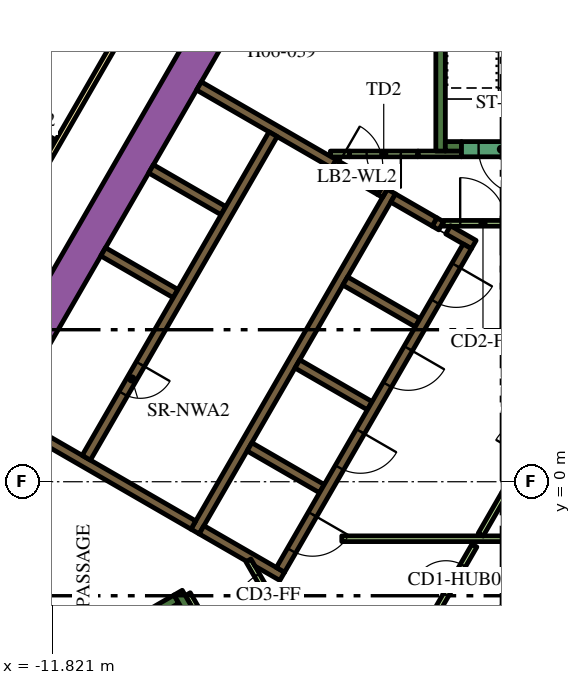
"""IFC4 building model, lengths in metres.
Left out: names, types, materials, properties, quantities, classifications, styles, units other than length and angle.
Written with IfcOpenShell. Run it as: python <this file> out.ifc"""

import sys

from ifc_helpers import new_model, si_unit, direction, frame, frame_2d, origin, place, context, subcontext, project, spatial, polyline, rectangle, outline, extrude, element, fill, save


model = new_model("IFC4")
c1 = context("Model", 3, precision=1e-05, world=origin(), true_north=direction((0.0, 1.0)))
c2 = subcontext(c1, "Body", "Model", "MODEL_VIEW")
j1 = project(units=[si_unit("LENGTHUNIT", "METRE"), si_unit("PLANEANGLEUNIT", "RADIAN")], contexts=[c1])
p1 = place(None, origin())
s1 = spatial("IfcSite", under=j1, at=p1, CompositionType="ELEMENT")
p2 = place(p1, origin())
s2 = spatial("IfcBuilding", under=s1, at=p2, CompositionType="ELEMENT")
p3 = place(p2, frame((0.0, 0.0, 91.5)))
s3 = spatial("IfcBuildingStorey", under=s2, at=p3, CompositionType="ELEMENT", Elevation=91.5)
p4 = place(p3, frame((-15.36, -1.503, 0.0), z_axis=(0.0, 0.0, 1.0), x_axis=(0.50000389221, 0.866023156604, 0.0)))
e1 = element("IfcWall", 1, at=p4, inside=s3, PredefinedType="SOLIDWALL", context=c2, shape_type="SweptSolid", body=[
    extrude(rectangle(XDim=21.0, YDim=0.9, at=frame_2d((10.5, 0.0))), origin(), (0.0, 0.0, 1.0), 3.9),
])
p5 = place(p3, frame((-1.6, 8.7, 0.0), z_axis=(0.0, 0.0, 1.0), x_axis=(0.0, 1.0, 0.0)))
e2 = element("IfcWall", 2, at=p5, inside=s3, PredefinedType="SOLIDWALL", context=c2, shape_type="SweptSolid", body=[
    extrude(rectangle(XDim=7.05, YDim=0.25, at=frame_2d((3.525, 0.0))), origin(), (0.0, 0.0, 1.0), 3.9),
])
p6 = place(p3, frame((-1.475, 8.825, 0.0), z_axis=(0.0, 0.0, 1.0), x_axis=(1.0, 0.0, 0.0)))
e3 = element("IfcWall", 3, at=p6, inside=s3, PredefinedType="SOLIDWALL", context=c2, shape_type="SweptSolid", body=[
    extrude(rectangle(XDim=0.425, YDim=0.25, at=frame_2d((0.212, 0.0))), origin(), (0.0, 0.0, 1.0), 3.9),
])
p7 = place(p3, frame((-14.44, -6.49, 0.0), z_axis=(0.0, 0.0, 1.0), x_axis=(0.866022966069, 0.500004222222, 0.0)))
e4 = element("IfcWall", 4, at=p7, inside=s3, PredefinedType="SOLIDWALL", context=c2, shape_type="SweptSolid", body=[
    extrude(rectangle(XDim=6.8, YDim=0.25, at=frame_2d((3.4, 0.0))), origin(), (0.0, 0.0, 1.0), 3.9),
])
p8 = place(p3, frame((-8.168, -3.503, 0.0), z_axis=(0.0, 0.0, 1.0), x_axis=(-0.499952099219, 0.866053057547, 0.0)))
e5 = element("IfcWall", 5, at=p8, inside=s3, PredefinedType="SOLIDWALL", context=c2, shape_type="SweptSolid", body=[
    extrude(rectangle(XDim=0.675, YDim=0.25, at=frame_2d((0.337, 0.0))), origin(), (0.0, 0.0, 1.0), 3.9),
])
p9 = place(p3, frame((-8.06, -1.311, 0.0), z_axis=(0.0, 0.0, 1.0), x_axis=(0.50000273126, 0.866023826885, 0.0)))
e6 = element("IfcWall", 6, at=p9, inside=s3, PredefinedType="SOLIDWALL", context=c2, shape_type="SweptSolid", body=[
    extrude(rectangle(XDim=10.33, YDim=0.25, at=frame_2d((5.165, 0.0))), origin(), (0.0, 0.0, 1.0), 3.9),
])
p10 = place(p3, frame((-1.758, 6.835, 0.0), z_axis=(0.0, 0.0, 1.0), x_axis=(0.865982457891, -0.500074377092, 0.0)))
e7 = element("IfcWall", 7, at=p10, inside=s3, PredefinedType="SOLIDWALL", context=c2, shape_type="SweptSolid", body=[
    extrude(rectangle(XDim=0.2, YDim=0.25, at=frame_2d((0.1, 0.0))), origin(), (0.0, 0.0, 1.0), 3.9),
])
p11 = place(p3, frame((-1.76, 6.836, 0.0), z_axis=(0.0, 0.0, 1.0), x_axis=(-0.865952863304, 0.500125622755, 0.0)))
e8 = element("IfcWall", 8, at=p11, inside=s3, PredefinedType="SOLIDWALL", context=c2, shape_type="SweptSolid", body=[
    extrude(rectangle(XDim=1.258, YDim=0.25, at=frame_2d((0.629, 0.0))), origin(), (0.0, 0.0, 1.0), 3.9),
])
p12 = place(p3, frame((-0.728, 6.24, 0.0), z_axis=(0.0, 0.0, 1.0), x_axis=(-0.865955664968, 0.500120771724, 0.0)))
e9 = element("IfcWall", 9, at=p12, inside=s3, PredefinedType="SOLIDWALL", context=c2, shape_type="SweptSolid", body=[
    extrude(rectangle(XDim=0.778, YDim=0.25, at=frame_2d((0.389, 0.0))), origin(), (0.0, 0.0, 1.0), 3.9),
])
for number, where, z_axis, x_axis in (
    (10, (-2.204, 4.182, 0.0), (0.0, 0.0, 1.0), (-0.866, 0.5, 0.0)),
    (11, (-5.369, 3.1, 0.0), (0.0, 0.0, 1.0), (0.866, -0.5, 0.0)),
    (12, (-4.724, -0.182, 0.0), (0.0, 0.0, 1.0), (-0.866, 0.5, 0.0)),
):
    element("IfcWall", number, at=place(p3, frame(where, z_axis=z_axis, x_axis=x_axis)), inside=s3, PredefinedType="SOLIDWALL", context=c2, shape_type="SweptSolid", body=[
        extrude(rectangle(XDim=2.2, YDim=0.25, at=frame_2d((1.1, 0.0))), origin(), (0.0, 0.0, 1.0), 3.9),
    ])
p13 = place(p3, origin())
e13 = element("IfcWall", 13, at=p13, inside=s3, PredefinedType="SOLIDWALL", context=c2, shape_type="SweptSolid", body=[
    extrude(outline(polyline([(-5.922, -2.257), (-5.922, -2.257), (-5.705, -2.382), (-5.83, -2.598), (-6.483, -2.221), (-6.591, -2.033), (-6.591, -2.033), (-6.7, -2.096), (-7.952, -1.373), (-7.827, -1.156), (-5.922, -2.257)])), origin(), (0.0, 0.0, 1.0), 3.9),
])
p14 = place(p3, frame((-8.106, -1.14, 0.0), z_axis=(0.0, 0.0, 1.0), x_axis=(-0.866000643155, 0.500042884217, 0.0)))
e14 = element("IfcWall", 14, at=p14, inside=s3, PredefinedType="SOLIDWALL", context=c2, shape_type="SweptSolid", body=[
    extrude(rectangle(XDim=5.65, YDim=0.25, at=frame_2d((2.825, 0.0))), origin(), (0.0, 0.0, 1.0), 3.9),
])
e15 = element("IfcWall", 15, at=p13, inside=s3, PredefinedType="SOLIDWALL", context=c2, shape_type="SweptSolid", body=[
    extrude(outline(polyline([(-3.128, 7.481), (-3.259, 7.557), (-3.134, 7.773), (-3.003, 7.698), (-3.128, 7.481)])), origin(), (0.0, 0.0, 1.0), 3.9),
])
for number, where, z_axis, x_axis in (
    (16, (-8.574, 4.95, 0.0), (0.0, 0.0, 1.0), (-0.866, 0.5, 0.0)),
    (17, (-7.314, 7.132, 0.0), (0.0, 0.0, 1.0), (-0.866, 0.5, 0.0)),
):
    element("IfcWall", number, at=place(p3, frame(where, z_axis=z_axis, x_axis=x_axis)), inside=s3, PredefinedType="SOLIDWALL", context=c2, shape_type="SweptSolid", body=[
        extrude(rectangle(XDim=2.2, YDim=0.25, at=frame_2d((1.1, 0.0))), origin(), (0.0, 0.0, 1.0), 3.9),
    ])
p15 = place(p3, frame((-7.959, 10.415, 0.0), z_axis=(0.0, 0.0, 1.0), x_axis=(0.866020958405, -0.500007699544, 0.0)))
e18 = element("IfcWall", 18, at=p15, inside=s3, PredefinedType="SOLIDWALL", context=c2, shape_type="SweptSolid", body=[
    extrude(rectangle(XDim=4.1, YDim=0.25, at=frame_2d((2.05, 0.0))), origin(), (0.0, 0.0, 1.0), 3.9),
])
p16 = place(p3, frame((-8.252, -2.958, 0.0), z_axis=(0.0, 0.0, 1.0), x_axis=(0.500174715838, -0.865924508047, 0.0)))
e19 = element("IfcWall", 19, at=p16, inside=s3, PredefinedType="PARTITIONING", context=c2, shape_type="SweptSolid", body=[
    extrude(rectangle(XDim=0.514, YDim=0.15, at=frame_2d((0.257, 0.0))), origin(), (0.0, 0.0, 1.0), 2.75),
])
p17 = place(p3, frame((-3.997, 8.625, 0.0), z_axis=(0.0, 0.0, 1.0), x_axis=(-1.0, 0.0, 0.0)))
e20 = element("IfcWall", 20, at=p17, inside=s3, PredefinedType="PARTITIONING", context=c2, shape_type="SweptSolid", body=[
    extrude(rectangle(XDim=0.502, YDim=0.15, at=frame_2d((0.251, 0.0))), origin(), (0.0, 0.0, 1.0), 2.75),
])
p18 = place(p3, frame((-2.196, 8.625, 0.0), z_axis=(0.0, 0.0, 1.0), x_axis=(1.0, 0.0, 0.0)))
e21 = element("IfcWall", 21, at=p18, inside=s3, PredefinedType="PARTITIONING", context=c2, shape_type="SweptSolid", body=[
    extrude(rectangle(XDim=1.146, YDim=0.15, at=frame_2d((0.573, 0.0))), origin(), (0.0, 0.0, 1.0), 2.75),
])
p19 = place(p3, frame((-4.2, -1.5, 0.0), z_axis=(0.0, 0.0, 1.0), x_axis=(1.0, 0.0, 0.0)))
e22 = element("IfcWall", 22, at=p19, inside=s3, PredefinedType="PARTITIONING", context=c2, shape_type="SweptSolid", body=[
    extrude(rectangle(XDim=9.359, YDim=0.15, at=frame_2d((4.68, 0.0))), origin(), (0.0, 0.0, 1.0), 2.75),
])
p20 = place(p3, frame((-0.544, -1.393, 0.0), z_axis=(0.0, 0.0, 1.0), x_axis=(0.499928740635, 0.866066541489, 0.0)))
e23 = element("IfcWall", 23, at=p20, inside=s3, PredefinedType="PARTITIONING", context=c2, shape_type="SweptSolid", body=[
    extrude(rectangle(XDim=1.912, YDim=0.15, at=frame_2d((0.956, 0.0))), origin(), (0.0, 0.0, 1.0), 2.75),
])
p21 = place(p3, frame((-6.008, 9.144, 0.0), z_axis=(0.0, 0.0, 1.0), x_axis=(-0.500006956611, -0.866021387346, 0.0)))
e24 = element("IfcWall", 24, at=p21, inside=s3, PredefinedType="SOLIDWALL", context=c2, shape_type="SweptSolid", body=[
    extrude(rectangle(XDim=9.83, YDim=0.25, at=frame_2d((4.915, 0.0))), origin(), (0.0, 0.0, 1.0), 3.9),
])
p22 = place(p21, frame((6.985, 0.0, 0.0)))
e25 = element("IfcOpeningElement", 25, at=p22, cuts=e24, PredefinedType="OPENING", context=c2, shape_type="SweptSolid", body=[
    extrude(rectangle(XDim=0.9, YDim=2.1, at=frame_2d((0.45, 1.05))), frame((0.0, 0.135, 0.0), z_axis=(0.0, -1.0, 0.0), x_axis=(1.0, 0.0, 0.0)), (0.0, 0.0, 1.0), 0.27),
])
p23 = place(p3, frame((-0.898, 6.194, 0.0), z_axis=(0.0, 0.0, 1.0), x_axis=(-0.499996202215, -0.866027596426, 0.0)))
e26 = element("IfcWall", 26, at=p23, inside=s3, PredefinedType="SOLIDWALL", context=c2, shape_type="SweptSolid", body=[
    extrude(rectangle(XDim=9.83, YDim=0.25, at=frame_2d((4.915, 0.0))), origin(), (0.0, 0.0, 1.0), 3.9),
])
p24 = place(p23, frame((0.585, 0.0, 0.0)))
e27 = element("IfcOpeningElement", 27, at=p24, cuts=e26, PredefinedType="OPENING", context=c2, shape_type="SweptSolid", body=[
    extrude(rectangle(XDim=1.1, YDim=2.1, at=frame_2d((0.55, 1.05))), frame((0.0, 0.135, 0.0), z_axis=(0.0, -1.0, 0.0), x_axis=(1.0, 0.0, 0.0)), (0.0, 0.0, 1.0), 0.27),
])
p25 = place(p23, frame((3.105, 0.0, 0.0)))
e28 = element("IfcOpeningElement", 28, at=p25, cuts=e26, PredefinedType="OPENING", context=c2, shape_type="SweptSolid", body=[
    extrude(rectangle(XDim=1.1, YDim=2.1, at=frame_2d((0.55, 1.05))), frame((0.0, 0.135, 0.0), z_axis=(0.0, -1.0, 0.0), x_axis=(1.0, 0.0, 0.0)), (0.0, 0.0, 1.0), 0.27),
])
p26 = place(p23, frame((5.625, 0.0, 0.0)))
e29 = element("IfcOpeningElement", 29, at=p26, cuts=e26, PredefinedType="OPENING", context=c2, shape_type="SweptSolid", body=[
    extrude(rectangle(XDim=1.1, YDim=2.1, at=frame_2d((0.55, 1.05))), frame((0.0, 0.135, 0.0), z_axis=(0.0, -1.0, 0.0), x_axis=(1.0, 0.0, 0.0)), (0.0, 0.0, 1.0), 0.27),
])
p27 = place(p23, frame((8.145, 0.0, 0.0)))
e30 = element("IfcOpeningElement", 30, at=p27, cuts=e26, PredefinedType="OPENING", context=c2, shape_type="SweptSolid", body=[
    extrude(rectangle(XDim=1.1, YDim=2.1, at=frame_2d((0.55, 1.05))), frame((0.0, 0.135, 0.0), z_axis=(0.0, -1.0, 0.0), x_axis=(1.0, 0.0, 0.0)), (0.0, 0.0, 1.0), 0.27),
])
p28 = place(p3, frame((1.05, 8.75, 0.0), z_axis=(0.0, 0.0, 1.0), x_axis=(-1.0, 0.0, 0.0)))
e31 = element("IfcWall", 31, at=p28, inside=s3, PredefinedType="SOLIDWALL", context=c2, shape_type="SweptSolid", body=[
    extrude(rectangle(XDim=2.1, YDim=0.4, at=frame_2d((1.05, 0.0))), origin(), (0.0, 0.0, 1.0), 3.9),
])
p29 = place(p28, frame((0.45, 0.0, 0.0)))
e32 = element("IfcOpeningElement", 32, at=p29, cuts=e31, PredefinedType="OPENING", context=c2, shape_type="SweptSolid", body=[
    extrude(rectangle(XDim=1.2, YDim=2.1, at=frame_2d((0.6, 1.05))), frame((0.0, 0.21, 0.0), z_axis=(0.0, -1.0, 0.0), x_axis=(1.0, 0.0, 0.0)), (0.0, 0.0, 1.0), 0.42),
])
p30 = place(p3, frame((-2.196, 8.625, 0.0), z_axis=(0.0, 0.0, 1.0), x_axis=(-1.0, 0.0, 0.0)))
e33 = element("IfcWall", 33, at=p30, inside=s3, PredefinedType="PARTITIONING", context=c2, shape_type="SweptSolid", body=[
    extrude(rectangle(XDim=1.8, YDim=0.15, at=frame_2d((0.9, 0.0))), origin(), (0.0, 0.0, 1.0), 2.75),
])
p31 = place(p30, frame((0.45, 0.0, 0.0)))
e34 = element("IfcOpeningElement", 34, at=p31, cuts=e33, PredefinedType="OPENING", context=c2, shape_type="SweptSolid", body=[
    extrude(rectangle(XDim=0.9, YDim=2.1, at=frame_2d((0.45, 1.05))), frame((0.0, 0.085, 0.0), z_axis=(0.0, -1.0, 0.0), x_axis=(1.0, 0.0, 0.0)), (0.0, 0.0, 1.0), 0.17),
])
p32 = place(p3, frame((-1.76, -3.498, 0.0), z_axis=(0.0, 0.0, 1.0), x_axis=(0.499977374825, 0.866038466041, 0.0)))
e35 = element("IfcWall", 35, at=p32, inside=s3, PredefinedType="PARTITIONING", context=c2, shape_type="SweptSolid", body=[
    extrude(rectangle(XDim=2.1, YDim=0.15, at=frame_2d((1.05, 0.0))), origin(), (0.0, 0.0, 1.0), 2.75),
])
p33 = place(p32, frame((0.6, 0.0, 0.0)))
e36 = element("IfcOpeningElement", 36, at=p33, cuts=e35, PredefinedType="OPENING", context=c2, shape_type="SweptSolid", body=[
    extrude(rectangle(XDim=0.9, YDim=2.1, at=frame_2d((0.45, 1.05))), frame((0.0, 0.085, 0.0), z_axis=(0.0, -1.0, 0.0), x_axis=(1.0, 0.0, 0.0)), (0.0, 0.0, 1.0), 0.17),
])
p34 = place(p3, frame((-1.534, 6.8, 0.0), z_axis=(0.0, 0.0, 1.0), x_axis=(1.0, 0.0, 0.0)))
e37 = element("IfcWall", 37, at=p34, inside=s3, PredefinedType="PARTITIONING", context=c2, shape_type="SweptSolid", body=[
    extrude(rectangle(XDim=2.1, YDim=0.15, at=frame_2d((1.05, 0.0))), origin(), (0.0, 0.0, 1.0), 2.75),
])
p35 = place(p34, frame((0.45, 0.0, 0.0)))
e38 = element("IfcOpeningElement", 38, at=p35, cuts=e37, PredefinedType="OPENING", context=c2, shape_type="SweptSolid", body=[
    extrude(rectangle(XDim=1.2, YDim=2.1, at=frame_2d((0.6, 1.05))), frame((0.0, 0.085, 0.0), z_axis=(0.0, -1.0, 0.0), x_axis=(1.0, 0.0, 0.0)), (0.0, 0.0, 1.0), 0.17),
])
p36 = place(p3, frame((-5.606, -3.89, 0.0), z_axis=(0.0, 0.0, 1.0), x_axis=(-0.500027713859, 0.866009402589, 0.0)))
e39 = element("IfcWall", 39, at=p36, inside=s3, PredefinedType="PARTITIONING", context=c2, shape_type="SweptSolid", body=[
    extrude(rectangle(XDim=2.1, YDim=0.15, at=frame_2d((1.05, 0.0))), origin(), (0.0, 0.0, 1.0), 2.75),
])
p37 = place(p36, frame((0.45, 0.0, 0.0)))
e40 = element("IfcOpeningElement", 40, at=p37, cuts=e39, PredefinedType="OPENING", context=c2, shape_type="SweptSolid", body=[
    extrude(rectangle(XDim=1.2, YDim=2.1, at=frame_2d((0.6, 1.05))), frame((0.0, 0.085, 0.0), z_axis=(0.0, -1.0, 0.0), x_axis=(1.0, 0.0, 0.0)), (0.0, 0.0, 1.0), 0.17),
])
p38 = place(p3, frame((-4.409, 8.365, 0.0), z_axis=(0.0, 0.0, 1.0), x_axis=(0.866034573852, -0.49998411664, 0.0)))
e41 = element("IfcWall", 41, at=p38, inside=s3, PredefinedType="SOLIDWALL", context=c2, shape_type="SweptSolid", body=[
    extrude(rectangle(XDim=1.4, YDim=0.25, at=frame_2d((0.7, 0.0))), origin(), (0.0, 0.0, 1.0), 3.9),
])
p39 = place(p38, frame((0.1, 0.0, 0.0)))
e42 = element("IfcOpeningElement", 42, at=p39, cuts=e41, PredefinedType="OPENING", context=c2, shape_type="SweptSolid", body=[
    extrude(rectangle(XDim=1.2, YDim=2.1, at=frame_2d((0.6, 1.05))), frame((0.0, 0.135, 0.0), z_axis=(0.0, -1.0, 0.0), x_axis=(1.0, 0.0, 0.0)), (0.0, 0.0, 1.0), 0.27),
])
p40 = place(p3, frame((-19.081, -3.9, 0.0), z_axis=(0.0, 0.0, 1.0), x_axis=(0.499998313975, 0.866026377209, 0.0)))
e43 = element("IfcWall", 43, at=p40, inside=s3, PredefinedType="PARTITIONING", context=c2, shape_type="SweptSolid", body=[
    extrude(rectangle(XDim=25.766, YDim=0.15, at=frame_2d((12.883, 0.0))), origin(), (0.0, 0.0, 1.0), 2.75),
])
p41 = place(p40, frame((19.306, 0.0, 0.0)))
e44 = element("IfcOpeningElement", 44, at=p41, cuts=e43, PredefinedType="OPENING", context=c2, shape_type="SweptSolid", body=[
    extrude(rectangle(XDim=1.0, YDim=2.1, at=frame_2d((0.5, 1.05))), frame((0.0, 0.085, 0.0), z_axis=(0.0, -1.0, 0.0), x_axis=(1.0, 0.0, 0.0)), (0.0, 0.0, 1.0), 0.17),
])
p42 = place(p40, frame((18.0, 0.0, 0.0)))
e45 = element("IfcOpeningElement", 45, at=p42, cuts=e43, PredefinedType="OPENING", context=c2, shape_type="SweptSolid", body=[
    extrude(rectangle(XDim=1.0, YDim=2.1, at=frame_2d((0.5, 1.05))), frame((0.0, 0.085, 0.0), z_axis=(0.0, -1.0, 0.0), x_axis=(1.0, 0.0, 0.0)), (0.0, 0.0, 1.0), 0.17),
])
p43 = place(p40, frame((10.874, 0.0, 0.0)))
e46 = element("IfcOpeningElement", 46, at=p43, cuts=e43, PredefinedType="OPENING", context=c2, shape_type="SweptSolid", body=[
    extrude(rectangle(XDim=0.9, YDim=2.1, at=frame_2d((0.45, 1.05))), frame((0.0, 0.085, 0.0), z_axis=(0.0, -1.0, 0.0), x_axis=(1.0, 0.0, 0.0)), (0.0, 0.0, 1.0), 0.17),
])
p44 = place(p40, frame((8.548, 0.0, 0.0)))
e47 = element("IfcOpeningElement", 47, at=p44, cuts=e43, PredefinedType="OPENING", context=c2, shape_type="SweptSolid", body=[
    extrude(rectangle(XDim=1.1, YDim=2.1, at=frame_2d((0.55, 1.05))), frame((0.0, 0.085, 0.0), z_axis=(0.0, -1.0, 0.0), x_axis=(1.0, 0.0, 0.0)), (0.0, 0.0, 1.0), 0.17),
])
p45 = place(p40, frame((0.18, 0.0, 0.0)))
e48 = element("IfcOpeningElement", 48, at=p45, cuts=e43, PredefinedType="OPENING", context=c2, shape_type="SweptSolid", body=[
    extrude(rectangle(XDim=1.0, YDim=2.1, at=frame_2d((0.5, 1.05))), frame((0.0, 0.085, 0.0), z_axis=(0.0, -1.0, 0.0), x_axis=(1.0, 0.0, 0.0)), (0.0, 0.0, 1.0), 0.17),
])
p46 = place(p3, frame((-11.75, 8.949, 0.0), z_axis=(0.0, 0.0, 1.0), x_axis=(-0.865997922154, 0.500047596559, 0.0)))
e49 = element("IfcWall", 49, at=p46, inside=s3, PredefinedType="PARTITIONING", context=c2, shape_type="SweptSolid", body=[
    extrude(rectangle(XDim=2.6, YDim=0.1, at=frame_2d((1.3, 0.0))), origin(), (0.0, 0.0, 1.0), 2.75),
])
p47 = place(p46, frame((0.6, 0.0, 0.0)))
e50 = element("IfcOpeningElement", 50, at=p47, cuts=e49, PredefinedType="OPENING", context=c2, shape_type="SweptSolid", body=[
    extrude(rectangle(XDim=0.9, YDim=2.1, at=frame_2d((0.45, 1.05))), frame((0.0, 0.06, 0.0), z_axis=(0.0, -1.0, 0.0), x_axis=(1.0, 0.0, 0.0)), (0.0, 0.0, 1.0), 0.12),
])
p48 = place(p22, origin())
e51 = element("IfcDoor", 51, at=p48, inside=s3, OperationType="SINGLE_SWING_LEFT", PredefinedType="DOOR", context=c2, shape_type="SweptSolid", body=[
    extrude(rectangle(XDim=0.9, YDim=2.1, at=frame_2d((0.45, 1.05))), frame((0.0, 0.025, 0.0), z_axis=(0.0, -1.0, 0.0), x_axis=(1.0, 0.0, 0.0)), (0.0, 0.0, 1.0), 0.05),
])
fill(e25, e51)
p49 = place(p24, origin())
e52 = element("IfcDoor", 52, at=p49, inside=s3, OperationType="DOUBLE_DOOR_SLIDING", PredefinedType="DOOR", context=c2, shape_type="SweptSolid", body=[
    extrude(rectangle(XDim=1.1, YDim=2.1, at=frame_2d((0.55, 1.05))), frame((0.0, 0.025, 0.0), z_axis=(0.0, -1.0, 0.0), x_axis=(1.0, 0.0, 0.0)), (0.0, 0.0, 1.0), 0.05),
])
fill(e27, e52)
p50 = place(p25, origin())
e53 = element("IfcDoor", 53, at=p50, inside=s3, OperationType="DOUBLE_DOOR_SLIDING", PredefinedType="DOOR", context=c2, shape_type="SweptSolid", body=[
    extrude(rectangle(XDim=1.1, YDim=2.1, at=frame_2d((0.55, 1.05))), frame((0.0, 0.025, 0.0), z_axis=(0.0, -1.0, 0.0), x_axis=(1.0, 0.0, 0.0)), (0.0, 0.0, 1.0), 0.05),
])
fill(e28, e53)
p51 = place(p26, origin())
e54 = element("IfcDoor", 54, at=p51, inside=s3, OperationType="DOUBLE_DOOR_SLIDING", PredefinedType="DOOR", context=c2, shape_type="SweptSolid", body=[
    extrude(rectangle(XDim=1.1, YDim=2.1, at=frame_2d((0.55, 1.05))), frame((0.0, 0.025, 0.0), z_axis=(0.0, -1.0, 0.0), x_axis=(1.0, 0.0, 0.0)), (0.0, 0.0, 1.0), 0.05),
])
fill(e29, e54)
p52 = place(p27, origin())
e55 = element("IfcDoor", 55, at=p52, inside=s3, OperationType="DOUBLE_DOOR_SLIDING", PredefinedType="DOOR", context=c2, shape_type="SweptSolid", body=[
    extrude(rectangle(XDim=1.1, YDim=2.1, at=frame_2d((0.55, 1.05))), frame((0.0, 0.025, 0.0), z_axis=(0.0, -1.0, 0.0), x_axis=(1.0, 0.0, 0.0)), (0.0, 0.0, 1.0), 0.05),
])
fill(e30, e55)
p53 = place(p29, origin())
e56 = element("IfcDoor", 56, at=p53, inside=s3, OperationType="SINGLE_SWING_LEFT", PredefinedType="DOOR", context=c2, shape_type="SweptSolid", body=[
    extrude(rectangle(XDim=1.2, YDim=2.1, at=frame_2d((0.6, 1.05))), frame((0.0, 0.025, 0.0), z_axis=(0.0, -1.0, 0.0), x_axis=(1.0, 0.0, 0.0)), (0.0, 0.0, 1.0), 0.05),
])
fill(e32, e56)
p54 = place(p31, origin())
e57 = element("IfcDoor", 57, at=p54, inside=s3, OperationType="SINGLE_SWING_LEFT", PredefinedType="DOOR", context=c2, shape_type="SweptSolid", body=[
    extrude(rectangle(XDim=0.9, YDim=2.1, at=frame_2d((0.45, 1.05))), frame((0.0, 0.025, 0.0), z_axis=(0.0, -1.0, 0.0), x_axis=(1.0, 0.0, 0.0)), (0.0, 0.0, 1.0), 0.05),
])
fill(e34, e57)
p55 = place(p33, origin())
e58 = element("IfcDoor", 58, at=p55, inside=s3, OperationType="SINGLE_SWING_LEFT", PredefinedType="DOOR", context=c2, shape_type="SweptSolid", body=[
    extrude(rectangle(XDim=0.9, YDim=2.1, at=frame_2d((0.45, 1.05))), frame((0.0, 0.025, 0.0), z_axis=(0.0, -1.0, 0.0), x_axis=(1.0, 0.0, 0.0)), (0.0, 0.0, 1.0), 0.05),
])
fill(e36, e58)
p56 = place(p35, origin())
e59 = element("IfcDoor", 59, at=p56, inside=s3, OperationType="SINGLE_SWING_LEFT", PredefinedType="DOOR", context=c2, shape_type="SweptSolid", body=[
    extrude(rectangle(XDim=1.2, YDim=2.1, at=frame_2d((0.6, 1.05))), frame((0.0, 0.025, 0.0), z_axis=(0.0, -1.0, 0.0), x_axis=(1.0, 0.0, 0.0)), (0.0, 0.0, 1.0), 0.05),
])
fill(e38, e59)
p57 = place(p37, origin())
e60 = element("IfcDoor", 60, at=p57, inside=s3, OperationType="SINGLE_SWING_LEFT", PredefinedType="DOOR", context=c2, shape_type="SweptSolid", body=[
    extrude(rectangle(XDim=1.2, YDim=2.1, at=frame_2d((0.6, 1.05))), frame((0.0, 0.025, 0.0), z_axis=(0.0, -1.0, 0.0), x_axis=(1.0, 0.0, 0.0)), (0.0, 0.0, 1.0), 0.05),
])
fill(e40, e60)
p58 = place(p39, origin())
e61 = element("IfcDoor", 61, at=p58, inside=s3, OperationType="SINGLE_SWING_LEFT", PredefinedType="DOOR", context=c2, shape_type="SweptSolid", body=[
    extrude(rectangle(XDim=1.2, YDim=2.1, at=frame_2d((0.6, 1.05))), frame((0.0, 0.025, 0.0), z_axis=(0.0, -1.0, 0.0), x_axis=(1.0, 0.0, 0.0)), (0.0, 0.0, 1.0), 0.05),
])
fill(e42, e61)
save(model, sys.argv[1])
